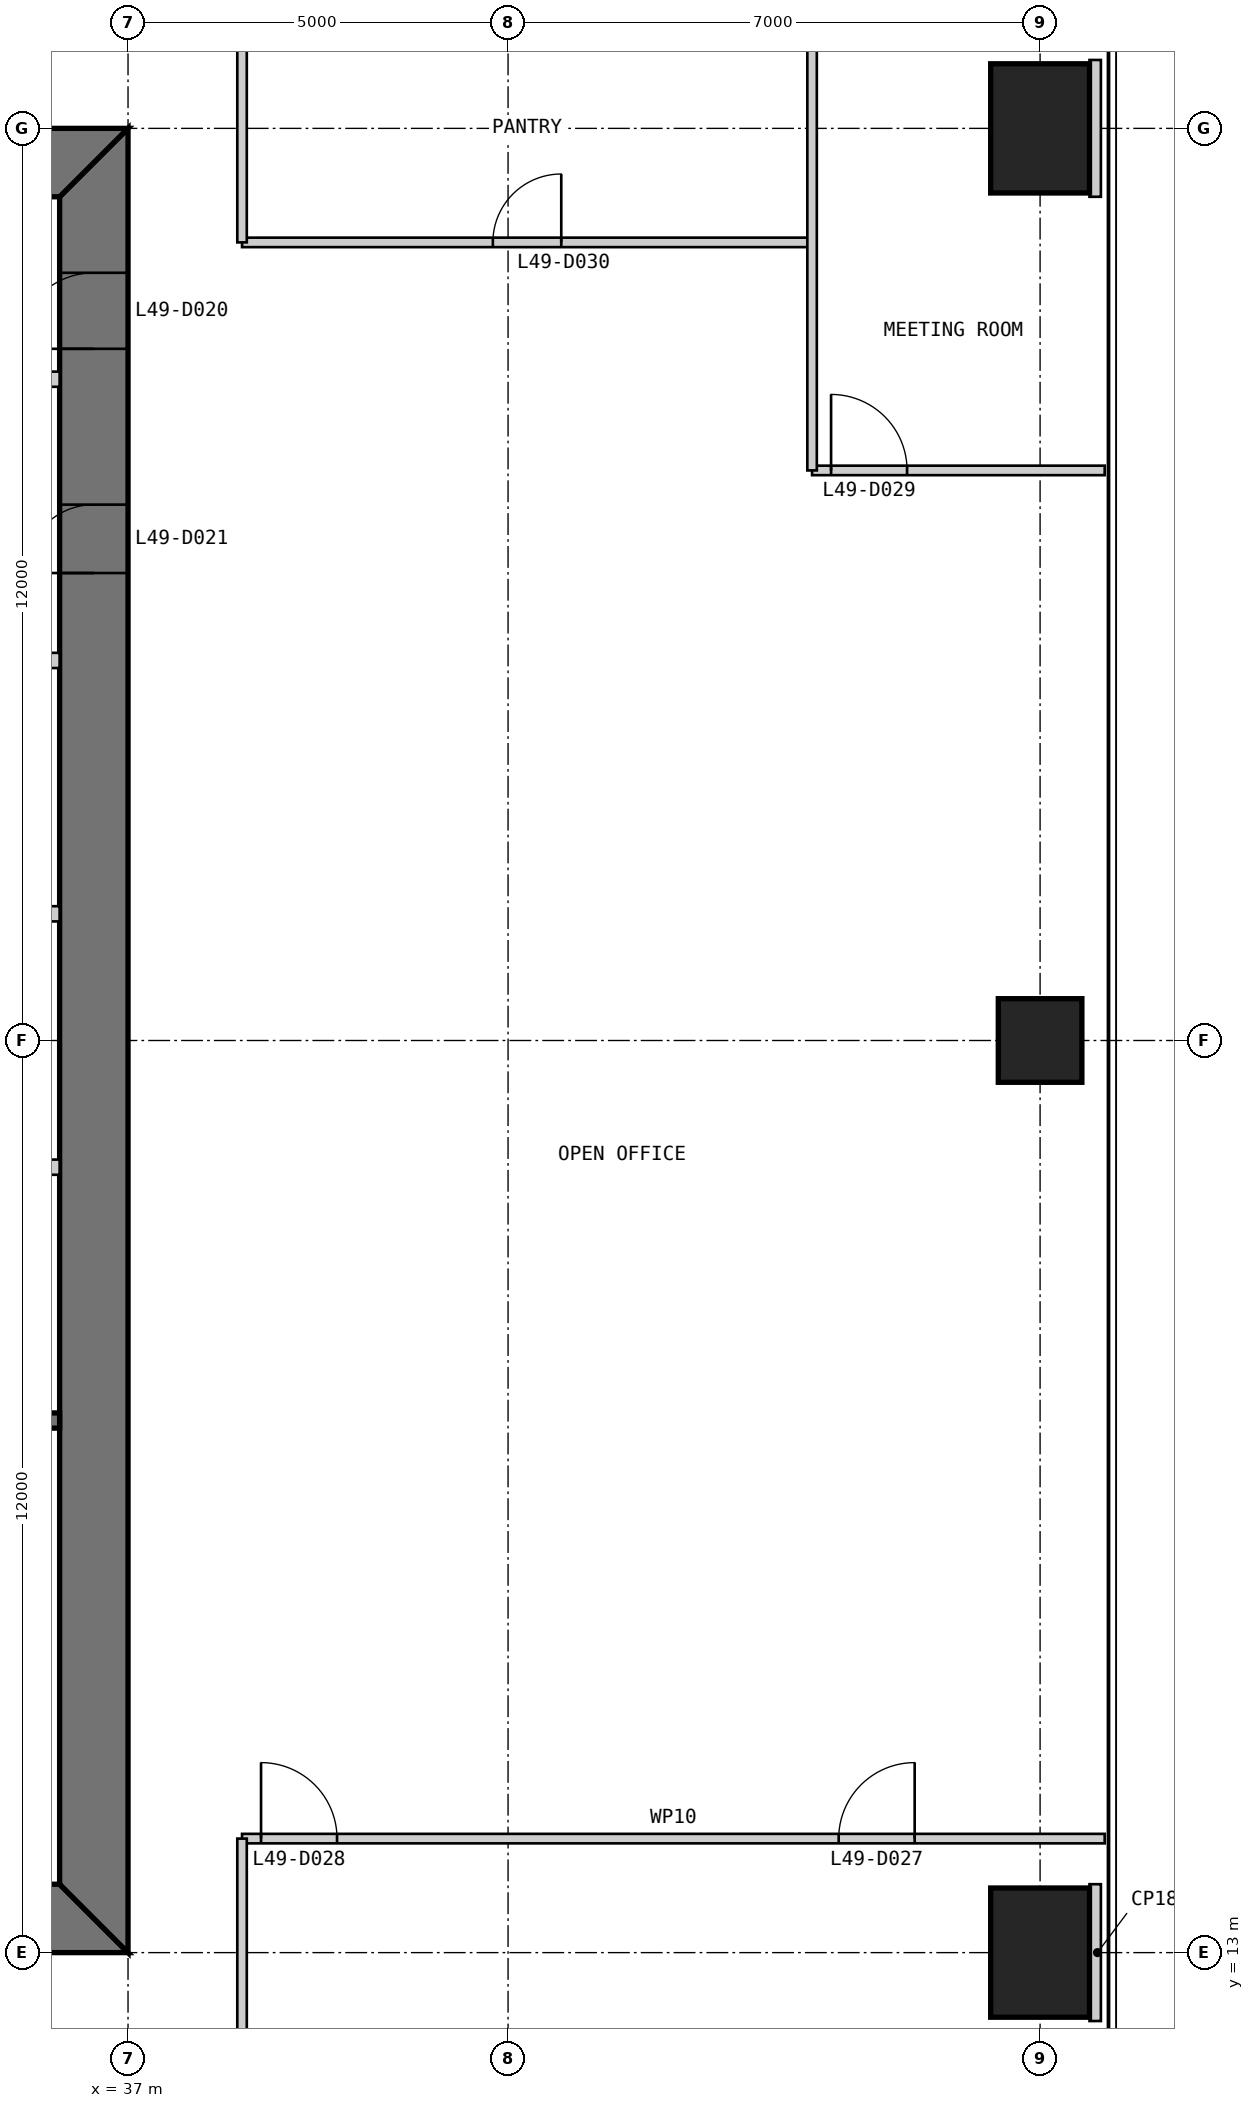
"""IFC4 building model, lengths in metres.
Left out: names, types, materials, properties, quantities, classifications, styles, units other than length and angle.
Written with IfcOpenShell. Run it as: python <this file> out.ifc"""

import sys

from ifc_helpers import new_model, si_unit, direction, frame, frame_2d, origin, origin_2d, place, context, subcontext, project, spatial, polyline, rectangle, outline, extrude, element, fill, save


model = new_model("IFC4")
c1 = context("Model", 3, precision=1e-05, world=origin(), true_north=direction((0.0, 1.0)))
c2 = subcontext(c1, "Body", "Model", "MODEL_VIEW")
j1 = project(units=[si_unit("LENGTHUNIT", "METRE"), si_unit("PLANEANGLEUNIT", "RADIAN")], contexts=[c1])
p1 = place(None, origin())
s1 = spatial("IfcSite", under=j1, at=p1, CompositionType="ELEMENT")
p2 = place(p1, origin())
s2 = spatial("IfcBuilding", under=s1, at=p2, CompositionType="ELEMENT")
p3 = place(p2, frame((0.0, 0.0, 209.8)))
s3 = spatial("IfcBuildingStorey", under=s2, at=p3, CompositionType="ELEMENT", Elevation=209.8)
p4 = place(p3, frame((49.0, 13.0, 0.0), z_axis=(0.0, 0.0, 1.0), x_axis=(1.0, 0.0, 0.0)))
e1 = element("IfcColumn", 1, at=p4, inside=s3, PredefinedType="COLUMN", context=c2, shape_type="SweptSolid", body=[
    extrude(rectangle(XDim=1.3, YDim=1.7, at=origin_2d()), origin(), (0.0, 0.0, 1.0), 4.0),
])
p5 = place(p3, frame((49.0, 25.0, 0.0), z_axis=(0.0, 0.0, 1.0), x_axis=(1.0, 0.0, 0.0)))
e2 = element("IfcColumn", 2, at=p5, inside=s3, PredefinedType="COLUMN", context=c2, shape_type="SweptSolid", body=[
    extrude(rectangle(XDim=1.1, YDim=1.1, at=origin_2d()), origin(), (0.0, 0.0, 1.0), 4.0),
])
p6 = place(p3, frame((49.0, 37.0, 0.0), z_axis=(0.0, 0.0, 1.0), x_axis=(1.0, 0.0, 0.0)))
e3 = element("IfcColumn", 3, at=p6, inside=s3, PredefinedType="COLUMN", context=c2, shape_type="SweptSolid", body=[
    extrude(rectangle(XDim=1.3, YDim=1.7, at=origin_2d()), origin(), (0.0, 0.0, 1.0), 4.0),
])
p7 = place(p3, frame((13.0, 13.45, 0.0), z_axis=(0.0, 0.0, 1.0), x_axis=(1.0, 0.0, 0.0)))
e4 = element("IfcWall", 4, at=p7, inside=s3, PredefinedType="SHEAR", context=c2, shape_type="SweptSolid", body=[
    extrude(outline(polyline([(0.0, -0.45), (24.0, -0.45), (23.1, 0.45), (0.9, 0.45), (0.0, -0.45)])), origin(), (0.0, 0.0, 1.0), 4.0),
])
p8 = place(p7, frame((4.9, 0.0, 0.0)))
e5 = element("IfcOpeningElement", 5, at=p8, cuts=e4, PredefinedType="OPENING", context=c2, shape_type="SweptSolid", body=[
    extrude(rectangle(XDim=1.0, YDim=2.2, at=frame_2d((0.5, 1.1))), frame((0.0, 0.46, 0.0), z_axis=(0.0, -1.0, 0.0), x_axis=(1.0, 0.0, 0.0)), (0.0, 0.0, 1.0), 0.92),
])
p9 = place(p7, frame((8.9, 0.0, 0.0)))
e6 = element("IfcOpeningElement", 6, at=p9, cuts=e4, PredefinedType="OPENING", context=c2, shape_type="SweptSolid", body=[
    extrude(rectangle(XDim=1.1, YDim=2.2, at=frame_2d((0.55, 1.1))), frame((0.0, 0.46, 0.0), z_axis=(0.0, -1.0, 0.0), x_axis=(1.0, 0.0, 0.0)), (0.0, 0.0, 1.0), 0.92),
])
p10 = place(p7, frame((15.05, 0.0, 0.0)))
e7 = element("IfcOpeningElement", 7, at=p10, cuts=e4, PredefinedType="OPENING", context=c2, shape_type="SweptSolid", body=[
    extrude(rectangle(XDim=0.9, YDim=2.2, at=frame_2d((0.45, 1.1))), frame((0.0, 0.46, 0.0), z_axis=(0.0, -1.0, 0.0), x_axis=(1.0, 0.0, 0.0)), (0.0, 0.0, 1.0), 0.92),
])
p11 = place(p7, frame((17.9, 0.0, 0.0)))
e8 = element("IfcOpeningElement", 8, at=p11, cuts=e4, PredefinedType="OPENING", context=c2, shape_type="SweptSolid", body=[
    extrude(rectangle(XDim=1.0, YDim=2.2, at=frame_2d((0.5, 1.1))), frame((0.0, 0.46, 0.0), z_axis=(0.0, -1.0, 0.0), x_axis=(1.0, 0.0, 0.0)), (0.0, 0.0, 1.0), 0.92),
])
p12 = place(p7, frame((21.4, 0.0, 0.0)))
e9 = element("IfcOpeningElement", 9, at=p12, cuts=e4, PredefinedType="OPENING", context=c2, shape_type="SweptSolid", body=[
    extrude(rectangle(XDim=1.0, YDim=2.2, at=frame_2d((0.5, 1.1))), frame((0.0, 0.46, 0.0), z_axis=(0.0, -1.0, 0.0), x_axis=(1.0, 0.0, 0.0)), (0.0, 0.0, 1.0), 0.92),
])
p13 = place(p3, frame((36.55, 13.9, 0.0), z_axis=(0.0, 0.0, 1.0), x_axis=(0.0, 1.0, 0.0)))
e10 = element("IfcWall", 10, at=p13, inside=s3, PredefinedType="SHEAR", context=c2, shape_type="SweptSolid", body=[
    extrude(outline(polyline([(-0.9, -0.45), (23.1, -0.45), (22.2, 0.45), (0.0, 0.45), (-0.9, -0.45)])), origin(), (0.0, 0.0, 1.0), 4.0),
])
p14 = place(p13, frame((20.2, 0.0, 0.0)))
e11 = element("IfcOpeningElement", 11, at=p14, cuts=e10, PredefinedType="OPENING", context=c2, shape_type="SweptSolid", body=[
    extrude(rectangle(XDim=1.0, YDim=2.2, at=frame_2d((0.5, 1.1))), frame((0.0, 0.46, 0.0), z_axis=(0.0, -1.0, 0.0), x_axis=(1.0, 0.0, 0.0)), (0.0, 0.0, 1.0), 0.92),
])
p15 = place(p13, frame((17.25, 0.0, 0.0)))
e12 = element("IfcOpeningElement", 12, at=p15, cuts=e10, PredefinedType="OPENING", context=c2, shape_type="SweptSolid", body=[
    extrude(rectangle(XDim=0.9, YDim=2.2, at=frame_2d((0.45, 1.1))), frame((0.0, 0.46, 0.0), z_axis=(0.0, -1.0, 0.0), x_axis=(1.0, 0.0, 0.0)), (0.0, 0.0, 1.0), 0.92),
])
p16 = place(p3, frame((37.0, 36.55, 0.0), z_axis=(0.0, 0.0, 1.0), x_axis=(-1.0, 0.0, 0.0)))
e13 = element("IfcWall", 13, at=p16, inside=s3, PredefinedType="SHEAR", context=c2, shape_type="SweptSolid", body=[
    extrude(outline(polyline([(0.0, -0.45), (24.0, -0.45), (23.1, 0.45), (0.9, 0.45), (0.0, -0.45)])), origin(), (0.0, 0.0, 1.0), 4.0),
])
p17 = place(p16, frame((4.9, 0.0, 0.0)))
e14 = element("IfcOpeningElement", 14, at=p17, cuts=e13, PredefinedType="OPENING", context=c2, shape_type="SweptSolid", body=[
    extrude(rectangle(XDim=1.0, YDim=2.2, at=frame_2d((0.5, 1.1))), frame((0.0, 0.46, 0.0), z_axis=(0.0, -1.0, 0.0), x_axis=(1.0, 0.0, 0.0)), (0.0, 0.0, 1.0), 0.92),
])
p18 = place(p16, frame((8.9, 0.0, 0.0)))
e15 = element("IfcOpeningElement", 15, at=p18, cuts=e13, PredefinedType="OPENING", context=c2, shape_type="SweptSolid", body=[
    extrude(rectangle(XDim=1.1, YDim=2.2, at=frame_2d((0.55, 1.1))), frame((0.0, 0.46, 0.0), z_axis=(0.0, -1.0, 0.0), x_axis=(1.0, 0.0, 0.0)), (0.0, 0.0, 1.0), 0.92),
])
p19 = place(p16, frame((15.05, 0.0, 0.0)))
e16 = element("IfcOpeningElement", 16, at=p19, cuts=e13, PredefinedType="OPENING", context=c2, shape_type="SweptSolid", body=[
    extrude(rectangle(XDim=0.9, YDim=2.2, at=frame_2d((0.45, 1.1))), frame((0.0, 0.46, 0.0), z_axis=(0.0, -1.0, 0.0), x_axis=(1.0, 0.0, 0.0)), (0.0, 0.0, 1.0), 0.92),
])
p20 = place(p16, frame((17.9, 0.0, 0.0)))
e17 = element("IfcOpeningElement", 17, at=p20, cuts=e13, PredefinedType="OPENING", context=c2, shape_type="SweptSolid", body=[
    extrude(rectangle(XDim=1.0, YDim=2.2, at=frame_2d((0.5, 1.1))), frame((0.0, 0.46, 0.0), z_axis=(0.0, -1.0, 0.0), x_axis=(1.0, 0.0, 0.0)), (0.0, 0.0, 1.0), 0.92),
])
p21 = place(p16, frame((21.4, 0.0, 0.0)))
e18 = element("IfcOpeningElement", 18, at=p21, cuts=e13, PredefinedType="OPENING", context=c2, shape_type="SweptSolid", body=[
    extrude(rectangle(XDim=1.0, YDim=2.2, at=frame_2d((0.5, 1.1))), frame((0.0, 0.46, 0.0), z_axis=(0.0, -1.0, 0.0), x_axis=(1.0, 0.0, 0.0)), (0.0, 0.0, 1.0), 0.92),
])
p22 = place(p3, frame((20.3, 20.0, 0.0), z_axis=(0.0, 0.0, 1.0), x_axis=(1.0, 0.0, 0.0)))
e19 = element("IfcWall", 19, at=p22, inside=s3, PredefinedType="SOLIDWALL", context=c2, shape_type="SweptSolid", body=[
    extrude(rectangle(XDim=15.8, YDim=0.2, at=frame_2d((7.9, 0.0))), origin(), (0.0, 0.0, 1.0), 3.8),
])
for number, where, z_axis, x_axis in (
    (20, (36.1, 30.0, 0.0), (0.0, 0.0, 1.0), (-1.0, 0.0, 0.0)),
    (21, (36.1, 26.667, 0.0), (0.0, 0.0, 1.0), (-1.0, 0.0, 0.0)),
    (22, (36.1, 23.333, 0.0), (0.0, 0.0, 1.0), (-1.0, 0.0, 0.0)),
    (23, (36.1, 33.7, 0.0), (0.0, 0.0, 1.0), (-1.0, 0.0, 0.0)),
):
    element("IfcWall", number, at=place(p3, frame(where, z_axis=z_axis, x_axis=x_axis)), inside=s3, PredefinedType="PARTITIONING", context=c2, shape_type="SweptSolid", body=[
        extrude(rectangle(XDim=2.8, YDim=0.2, at=frame_2d((1.4, 0.0))), origin(), (0.0, 0.0, 1.0), 3.8),
    ])
p23 = place(p3, frame((49.85, 14.5, 0.0), z_axis=(0.0, 0.0, 1.0), x_axis=(-1.0, 0.0, 0.0)))
e24 = element("IfcWall", 24, at=p23, inside=s3, PredefinedType="PARTITIONING", context=c2, shape_type="SweptSolid", body=[
    extrude(rectangle(XDim=11.35, YDim=0.125, at=frame_2d((5.675, 0.0))), origin(), (0.0, 0.0, 1.0), 3.85),
])
p24 = place(p23, frame((2.5, 0.0, 0.0)))
e25 = element("IfcOpeningElement", 25, at=p24, cuts=e24, PredefinedType="OPENING", context=c2, shape_type="SweptSolid", body=[
    extrude(rectangle(XDim=1.0, YDim=2.2, at=frame_2d((0.5, 1.1))), frame((0.0, 0.073, 0.0), z_axis=(0.0, -1.0, 0.0), x_axis=(1.0, 0.0, 0.0)), (0.0, 0.0, 1.0), 0.145),
])
p25 = place(p23, frame((10.1, 0.0, 0.0)))
e26 = element("IfcOpeningElement", 26, at=p25, cuts=e24, PredefinedType="OPENING", context=c2, shape_type="SweptSolid", body=[
    extrude(rectangle(XDim=1.0, YDim=2.2, at=frame_2d((0.5, 1.1))), frame((0.0, 0.073, 0.0), z_axis=(0.0, -1.0, 0.0), x_axis=(1.0, 0.0, 0.0)), (0.0, 0.0, 1.0), 0.145),
])
p26 = place(p3, frame((49.85, 32.5, 0.0), z_axis=(0.0, 0.0, 1.0), x_axis=(-1.0, 0.0, 0.0)))
e27 = element("IfcWall", 27, at=p26, inside=s3, PredefinedType="PARTITIONING", context=c2, shape_type="SweptSolid", body=[
    extrude(rectangle(XDim=3.85, YDim=0.125, at=frame_2d((1.925, 0.0))), origin(), (0.0, 0.0, 1.0), 3.85),
])
p27 = place(p26, frame((2.6, 0.0, 0.0)))
e28 = element("IfcOpeningElement", 28, at=p27, cuts=e27, PredefinedType="OPENING", context=c2, shape_type="SweptSolid", body=[
    extrude(rectangle(XDim=1.0, YDim=2.2, at=frame_2d((0.5, 1.1))), frame((0.0, 0.073, 0.0), z_axis=(0.0, -1.0, 0.0), x_axis=(1.0, 0.0, 0.0)), (0.0, 0.0, 1.0), 0.145),
])
p28 = place(p3, frame((46.0, 35.5, 0.0), z_axis=(0.0, 0.0, 1.0), x_axis=(-1.0, 0.0, 0.0)))
e29 = element("IfcWall", 29, at=p28, inside=s3, PredefinedType="PARTITIONING", context=c2, shape_type="SweptSolid", body=[
    extrude(rectangle(XDim=7.5, YDim=0.125, at=frame_2d((3.75, 0.0))), origin(), (0.0, 0.0, 1.0), 3.85),
])
p29 = place(p28, frame((3.3, 0.0, 0.0)))
e30 = element("IfcOpeningElement", 30, at=p29, cuts=e29, PredefinedType="OPENING", context=c2, shape_type="SweptSolid", body=[
    extrude(rectangle(XDim=0.9, YDim=2.2, at=frame_2d((0.45, 1.1))), frame((0.0, 0.073, 0.0), z_axis=(0.0, -1.0, 0.0), x_axis=(1.0, 0.0, 0.0)), (0.0, 0.0, 1.0), 0.145),
])
p30 = place(p3, frame((46.0, 32.5, 0.0), z_axis=(0.0, 0.0, 1.0), x_axis=(0.0, 1.0, 0.0)))
e31 = element("IfcWall", 31, at=p30, inside=s3, PredefinedType="PARTITIONING", context=c2, shape_type="SweptSolid", body=[
    extrude(rectangle(XDim=6.0, YDim=0.125, at=frame_2d((3.0, 0.0))), origin(), (0.0, 0.0, 1.0), 3.238),
])
for number, where, z_axis, x_axis in (
    (32, (38.5, 11.5, 0.0), (0.0, 0.0, 1.0), (0.0, 1.0, 0.0)),
    (33, (38.5, 35.5, 0.0), (0.0, 0.0, 1.0), (0.0, 1.0, 0.0)),
):
    element("IfcWall", number, at=place(p3, frame(where, z_axis=z_axis, x_axis=x_axis)), inside=s3, PredefinedType="PARTITIONING", context=c2, shape_type="SweptSolid", body=[
        extrude(rectangle(XDim=3.0, YDim=0.125, at=frame_2d((1.5, 0.0))), origin(), (0.0, 0.0, 1.0), 3.85),
    ])
for number, where, z_axis, x_axis in (
    (34, (49.8, 13.0, 0.0), (0.0, 0.0, 1.0), (-1.0, 0.0, 0.0)),
    (35, (49.8, 37.0, 0.0), (0.0, 0.0, 1.0), (-1.0, 0.0, 0.0)),
):
    element("IfcWall", number, at=place(p3, frame(where, z_axis=z_axis, x_axis=x_axis)), inside=s3, PredefinedType="PARTITIONING", context=c2, shape_type="SweptSolid", body=[
        extrude(rectangle(XDim=0.15, YDim=1.8, at=frame_2d((0.075, 0.0))), origin(), (0.0, 0.0, 1.0), 3.85),
    ])
p31 = place(p14, origin())
e36 = element("IfcDoor", 36, at=p31, inside=s3, OperationType="SINGLE_SWING_LEFT", PredefinedType="DOOR", context=c2, shape_type="SweptSolid", body=[
    extrude(rectangle(XDim=1.0, YDim=2.2, at=frame_2d((0.5, 1.1))), frame((0.0, 0.025, 0.0), z_axis=(0.0, -1.0, 0.0), x_axis=(1.0, 0.0, 0.0)), (0.0, 0.0, 1.0), 0.05),
    extrude(outline(polyline([(0.0, 0.0), (0.04, 0.0), (0.04, 2.16), (0.96, 2.16), (0.96, 0.0), (1.0, 0.0), (1.0, 2.2), (0.0, 2.2), (0.0, 0.0)])), frame((0.0, 0.3, 0.0), z_axis=(0.0, -1.0, 0.0), x_axis=(1.0, 0.0, 0.0)), (0.0, 0.0, 1.0), 0.6),
])
fill(e11, e36)
p32 = place(p15, origin())
e37 = element("IfcDoor", 37, at=p32, inside=s3, OperationType="SINGLE_SWING_LEFT", PredefinedType="DOOR", context=c2, shape_type="SweptSolid", body=[
    extrude(rectangle(XDim=0.9, YDim=2.2, at=frame_2d((0.45, 1.1))), frame((0.0, 0.025, 0.0), z_axis=(0.0, -1.0, 0.0), x_axis=(1.0, 0.0, 0.0)), (0.0, 0.0, 1.0), 0.05),
    extrude(outline(polyline([(0.0, 0.0), (0.04, 0.0), (0.04, 2.16), (0.86, 2.16), (0.86, 0.0), (0.9, 0.0), (0.9, 2.2), (0.0, 2.2), (0.0, 0.0)])), frame((0.0, 0.3, 0.0), z_axis=(0.0, -1.0, 0.0), x_axis=(1.0, 0.0, 0.0)), (0.0, 0.0, 1.0), 0.6),
])
fill(e12, e37)
p33 = place(p24, frame((1.0, 0.0, 0.0), z_axis=(0.0, 0.0, 1.0), x_axis=(-1.0, 0.0, 0.0)))
e38 = element("IfcDoor", 38, at=p33, inside=s3, OperationType="SINGLE_SWING_RIGHT", PredefinedType="DOOR", context=c2, shape_type="SweptSolid", body=[
    extrude(rectangle(XDim=1.0, YDim=2.2, at=frame_2d((0.5, 1.1))), frame((0.0, 0.025, 0.0), z_axis=(0.0, -1.0, 0.0), x_axis=(1.0, 0.0, 0.0)), (0.0, 0.0, 1.0), 0.05),
])
fill(e25, e38)
p34 = place(p25, frame((1.0, 0.0, 0.0), z_axis=(0.0, 0.0, 1.0), x_axis=(-1.0, 0.0, 0.0)))
e39 = element("IfcDoor", 39, at=p34, inside=s3, OperationType="SINGLE_SWING_LEFT", PredefinedType="DOOR", context=c2, shape_type="SweptSolid", body=[
    extrude(rectangle(XDim=1.0, YDim=2.2, at=frame_2d((0.5, 1.1))), frame((0.0, 0.025, 0.0), z_axis=(0.0, -1.0, 0.0), x_axis=(1.0, 0.0, 0.0)), (0.0, 0.0, 1.0), 0.05),
])
fill(e26, e39)
p35 = place(p27, frame((1.0, 0.0, 0.0), z_axis=(0.0, 0.0, 1.0), x_axis=(-1.0, 0.0, 0.0)))
e40 = element("IfcDoor", 40, at=p35, inside=s3, OperationType="SINGLE_SWING_LEFT", PredefinedType="DOOR", context=c2, shape_type="SweptSolid", body=[
    extrude(rectangle(XDim=1.0, YDim=2.2, at=frame_2d((0.5, 1.1))), frame((0.0, 0.025, 0.0), z_axis=(0.0, -1.0, 0.0), x_axis=(1.0, 0.0, 0.0)), (0.0, 0.0, 1.0), 0.05),
])
fill(e28, e40)
p36 = place(p29, frame((0.9, 0.0, 0.0), z_axis=(0.0, 0.0, 1.0), x_axis=(-1.0, 0.0, 0.0)))
e41 = element("IfcDoor", 41, at=p36, inside=s3, OperationType="SINGLE_SWING_RIGHT", PredefinedType="DOOR", context=c2, shape_type="SweptSolid", body=[
    extrude(rectangle(XDim=0.9, YDim=2.2, at=frame_2d((0.45, 1.1))), frame((0.0, 0.025, 0.0), z_axis=(0.0, -1.0, 0.0), x_axis=(1.0, 0.0, 0.0)), (0.0, 0.0, 1.0), 0.05),
])
fill(e30, e41)
save(model, sys.argv[1])
